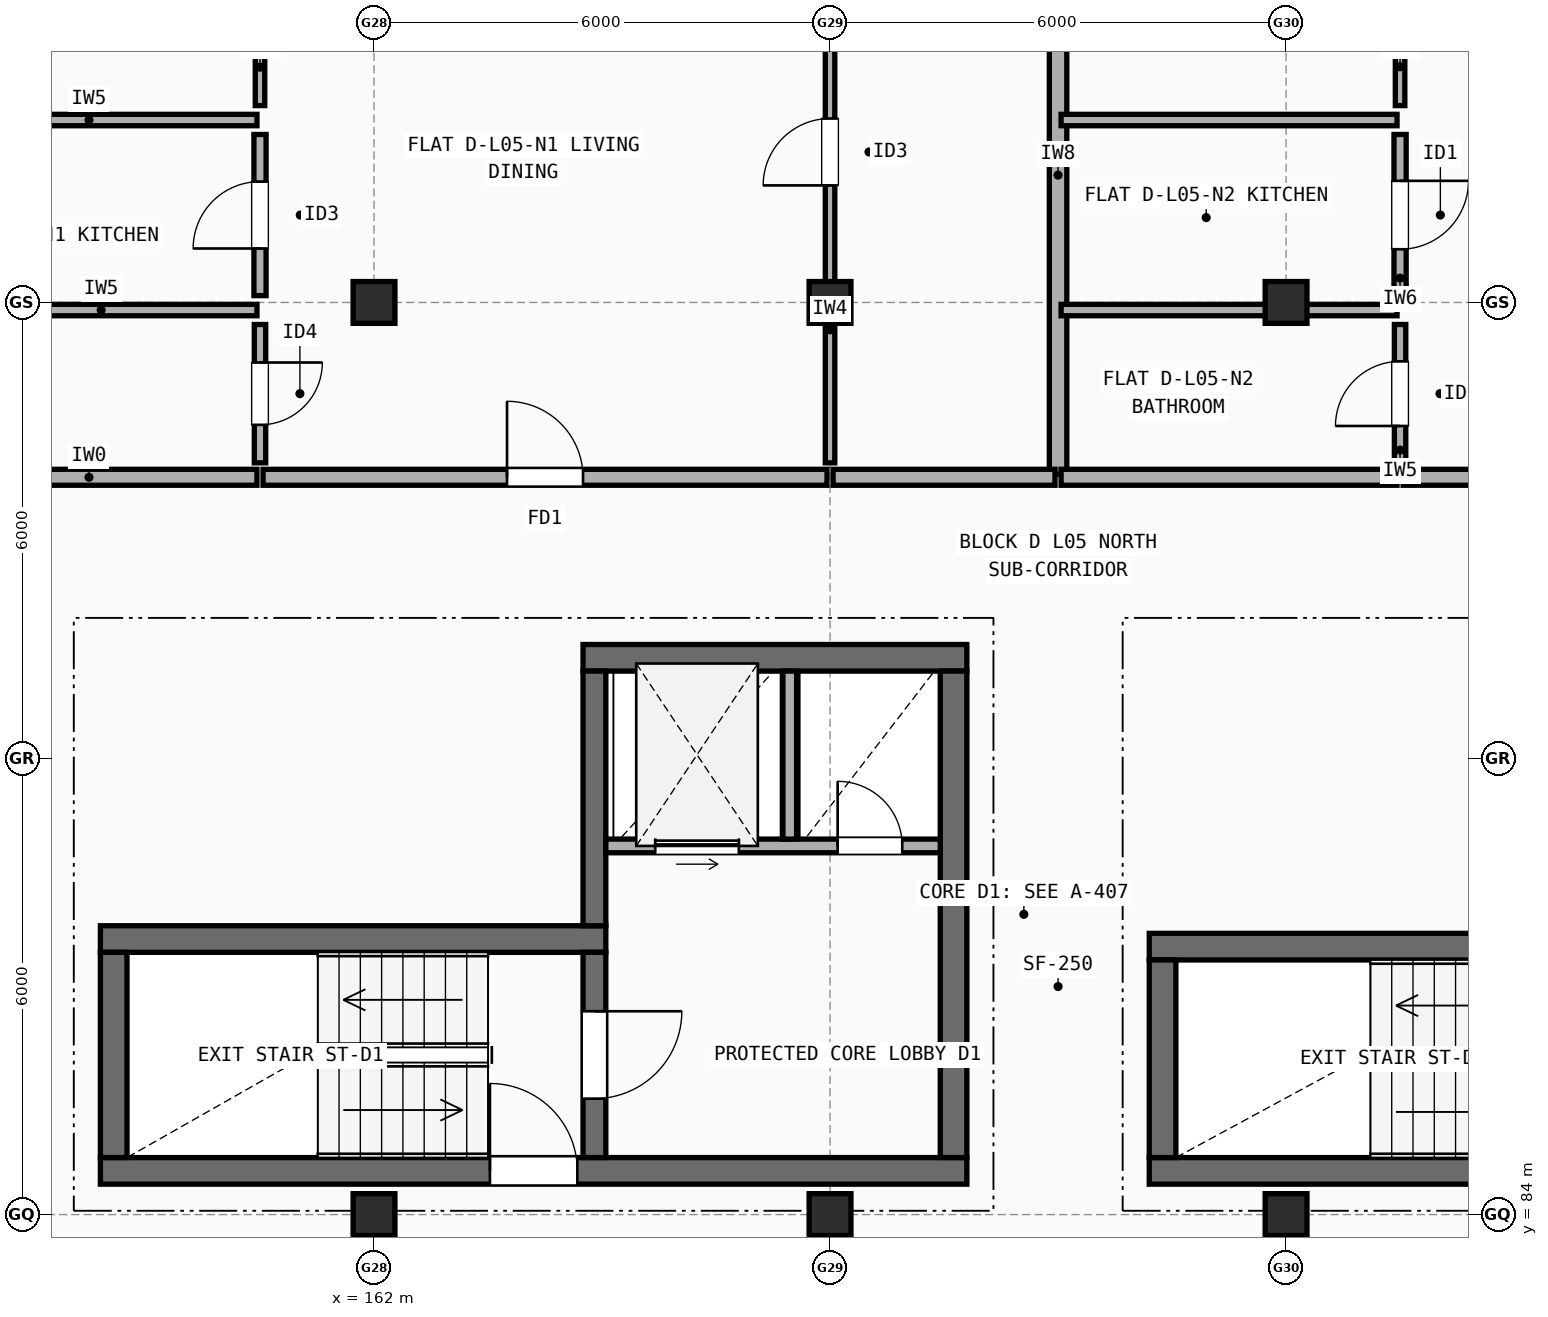
"""IFC4 building model, lengths in metres.
Left out: names, types, materials, properties, quantities, classifications, styles, units other than length and angle.
Written with IfcOpenShell. Run it as: python <this file> out.ifc"""

import sys

from ifc_helpers import new_model, si_unit, direction, frame, frame_2d, origin, origin_2d, place, context, subcontext, project, spatial, rectangle, extrude, element, fill, save


model = new_model("IFC4")
c1 = context("Model", 3, precision=1e-05, world=origin(), true_north=direction((0.0, 1.0)))
c2 = subcontext(c1, "Body", "Model", "MODEL_VIEW")
j1 = project(units=[si_unit("LENGTHUNIT", "METRE"), si_unit("PLANEANGLEUNIT", "RADIAN")], contexts=[c1])
p1 = place(None, origin())
s1 = spatial("IfcSite", under=j1, at=p1, CompositionType="ELEMENT")
p2 = place(p1, origin())
s2 = spatial("IfcBuilding", under=s1, at=p2, CompositionType="ELEMENT")
p3 = place(p2, frame((0.0, 0.0, 17.3)))
s3 = spatial("IfcBuildingStorey", under=s2, at=p3, CompositionType="ELEMENT", Elevation=17.3)
for number, where, z_axis, x_axis in (
    (1, (162.0, 84.0, 0.0), (0.0, 0.0, 1.0), (1.0, 0.0, 0.0)),
    (2, (162.0, 96.0, 0.0), (0.0, 0.0, 1.0), (1.0, 0.0, 0.0)),
    (3, (168.0, 84.0, 0.0), (0.0, 0.0, 1.0), (1.0, 0.0, 0.0)),
    (4, (168.0, 96.0, 0.0), (0.0, 0.0, 1.0), (1.0, 0.0, 0.0)),
    (5, (174.0, 84.0, 0.0), (0.0, 0.0, 1.0), (1.0, 0.0, 0.0)),
    (6, (174.0, 96.0, 0.0), (0.0, 0.0, 1.0), (1.0, 0.0, 0.0)),
):
    element("IfcColumn", number, at=place(p3, frame(where, z_axis=z_axis, x_axis=x_axis)), inside=s3, PredefinedType="COLUMN", context=c2, shape_type="SweptSolid", body=[
        extrude(rectangle(XDim=0.55, YDim=0.55, at=origin_2d()), origin(), (0.0, 0.0, 1.0), 2.965),
    ])
p4 = place(p3, frame((158.4, 84.575, 0.0), z_axis=(0.0, 0.0, 1.0), x_axis=(1.0, 0.0, 0.0)))
e7 = element("IfcWall", 7, at=p4, inside=s3, PredefinedType="SHEAR", context=c2, shape_type="SweptSolid", body=[
    extrude(rectangle(XDim=11.4, YDim=0.35, at=frame_2d((5.7, 0.0))), origin(), (0.0, 0.0, 1.0), 2.965),
])
p5 = place(p4, frame((5.125, 0.0, 0.0)))
e8 = element("IfcOpeningElement", 8, at=p5, cuts=e7, PredefinedType="OPENING", context=c2, shape_type="SweptSolid", body=[
    extrude(rectangle(XDim=1.15, YDim=2.15, at=frame_2d((0.575, 1.075))), frame((0.0, 0.185, 0.0), z_axis=(0.0, -1.0, 0.0), x_axis=(1.0, 0.0, 0.0)), (0.0, 0.0, 1.0), 0.37),
])
p6 = place(p3, frame((165.05, 87.625, 0.0), z_axis=(0.0, 0.0, 1.0), x_axis=(-1.0, 0.0, 0.0)))
e9 = element("IfcWall", 9, at=p6, inside=s3, PredefinedType="SHEAR", context=c2, shape_type="SweptSolid", body=[
    extrude(rectangle(XDim=6.65, YDim=0.35, at=frame_2d((3.325, 0.0))), origin(), (0.0, 0.0, 1.0), 2.965),
])
p7 = place(p3, frame((158.575, 87.45, 0.0), z_axis=(0.0, 0.0, 1.0), x_axis=(0.0, -1.0, 0.0)))
e10 = element("IfcWall", 10, at=p7, inside=s3, PredefinedType="SHEAR", context=c2, shape_type="SweptSolid", body=[
    extrude(rectangle(XDim=2.7, YDim=0.35, at=frame_2d((1.35, 0.0))), origin(), (0.0, 0.0, 1.0), 2.965),
])
p8 = place(p3, frame((164.9, 84.75, 0.0), z_axis=(0.0, 0.0, 1.0), x_axis=(0.0, 1.0, 0.0)))
e11 = element("IfcWall", 11, at=p8, inside=s3, PredefinedType="SHEAR", context=c2, shape_type="SweptSolid", body=[
    extrude(rectangle(XDim=2.7, YDim=0.3, at=frame_2d((1.35, 0.0))), origin(), (0.0, 0.0, 1.0), 2.965),
])
p9 = place(p8, frame((0.775, 0.0, 0.0)))
e12 = element("IfcOpeningElement", 12, at=p9, cuts=e11, PredefinedType="OPENING", context=c2, shape_type="SweptSolid", body=[
    extrude(rectangle(XDim=1.15, YDim=2.15, at=frame_2d((0.575, 1.075))), frame((0.0, 0.16, 0.0), z_axis=(0.0, -1.0, 0.0), x_axis=(1.0, 0.0, 0.0)), (0.0, 0.0, 1.0), 0.32),
])
p10 = place(p3, frame((169.8, 91.325, 0.0), z_axis=(0.0, 0.0, 1.0), x_axis=(-1.0, 0.0, 0.0)))
e13 = element("IfcWall", 13, at=p10, inside=s3, PredefinedType="SHEAR", context=c2, shape_type="SweptSolid", body=[
    extrude(rectangle(XDim=5.05, YDim=0.35, at=frame_2d((2.525, 0.0))), origin(), (0.0, 0.0, 1.0), 2.965),
])
p11 = place(p3, frame((169.625, 84.75, 0.0), z_axis=(0.0, 0.0, 1.0), x_axis=(0.0, 1.0, 0.0)))
e14 = element("IfcWall", 14, at=p11, inside=s3, PredefinedType="SHEAR", context=c2, shape_type="SweptSolid", body=[
    extrude(rectangle(XDim=6.4, YDim=0.35, at=frame_2d((3.2, 0.0))), origin(), (0.0, 0.0, 1.0), 2.965),
])
p12 = place(p3, frame((164.9, 87.8, 0.0), z_axis=(0.0, 0.0, 1.0), x_axis=(0.0, 1.0, 0.0)))
e15 = element("IfcWall", 15, at=p12, inside=s3, PredefinedType="SHEAR", context=c2, shape_type="SweptSolid", body=[
    extrude(rectangle(XDim=3.35, YDim=0.3, at=frame_2d((1.675, 0.0))), origin(), (0.0, 0.0, 1.0), 2.965),
])
p13 = place(p3, frame((165.05, 88.85, 0.0), z_axis=(0.0, 0.0, 1.0), x_axis=(1.0, 0.0, 0.0)))
e16 = element("IfcWall", 16, at=p13, inside=s3, PredefinedType="SOLIDWALL", context=c2, shape_type="SweptSolid", body=[
    extrude(rectangle(XDim=4.4, YDim=0.18, at=frame_2d((2.2, 0.0))), origin(), (0.0, 0.0, 1.0), 2.965),
])
p14 = place(p13, frame((0.65, 0.0, 0.0)))
e17 = element("IfcOpeningElement", 17, at=p14, cuts=e16, PredefinedType="OPENING", context=c2, shape_type="SweptSolid", body=[
    extrude(rectangle(XDim=1.1, YDim=2.15, at=frame_2d((0.55, 1.075))), frame((0.0, 0.1, 0.0), z_axis=(0.0, -1.0, 0.0), x_axis=(1.0, 0.0, 0.0)), (0.0, 0.0, 1.0), 0.2),
])
p15 = place(p13, frame((3.05, 0.0, 0.0)))
e18 = element("IfcOpeningElement", 18, at=p15, cuts=e16, PredefinedType="OPENING", context=c2, shape_type="SweptSolid", body=[
    extrude(rectangle(XDim=0.85, YDim=2.1, at=frame_2d((0.425, 1.05))), frame((0.0, 0.1, 0.0), z_axis=(0.0, -1.0, 0.0), x_axis=(1.0, 0.0, 0.0)), (0.0, 0.0, 1.0), 0.2),
])
p16 = place(p3, frame((167.47, 88.94, 0.0), z_axis=(0.0, 0.0, 1.0), x_axis=(0.0, 1.0, 0.0)))
e19 = element("IfcWall", 19, at=p16, inside=s3, PredefinedType="SOLIDWALL", context=c2, shape_type="SweptSolid", body=[
    extrude(rectangle(XDim=2.21, YDim=0.18, at=frame_2d((1.105, 0.0))), origin(), (0.0, 0.0, 1.0), 2.965),
])
p17 = place(p3, frame((172.2, 84.575, 0.0), z_axis=(0.0, 0.0, 1.0), x_axis=(1.0, 0.0, 0.0)))
e20 = element("IfcWall", 20, at=p17, inside=s3, PredefinedType="SHEAR", context=c2, shape_type="SweptSolid", body=[
    extrude(rectangle(XDim=11.4, YDim=0.35, at=frame_2d((5.7, 0.0))), origin(), (0.0, 0.0, 1.0), 2.965),
])
p18 = place(p17, frame((8.15, 0.0, 0.0)))
e21 = element("IfcOpeningElement", 21, at=p18, cuts=e20, PredefinedType="OPENING", context=c2, shape_type="SweptSolid", body=[
    extrude(rectangle(XDim=1.2, YDim=2.15, at=frame_2d((0.6, 1.075))), frame((0.0, 0.185, 0.0), z_axis=(0.0, -1.0, 0.0), x_axis=(1.0, 0.0, 0.0)), (0.0, 0.0, 1.0), 0.37),
])
p19 = place(p3, frame((178.85, 87.525, 0.0), z_axis=(0.0, 0.0, 1.0), x_axis=(-1.0, 0.0, 0.0)))
e22 = element("IfcWall", 22, at=p19, inside=s3, PredefinedType="SHEAR", context=c2, shape_type="SweptSolid", body=[
    extrude(rectangle(XDim=6.65, YDim=0.35, at=frame_2d((3.325, 0.0))), origin(), (0.0, 0.0, 1.0), 2.965),
])
p20 = place(p3, frame((172.375, 87.35, 0.0), z_axis=(0.0, 0.0, 1.0), x_axis=(0.0, -1.0, 0.0)))
e23 = element("IfcWall", 23, at=p20, inside=s3, PredefinedType="SHEAR", context=c2, shape_type="SweptSolid", body=[
    extrude(rectangle(XDim=2.6, YDim=0.35, at=frame_2d((1.3, 0.0))), origin(), (0.0, 0.0, 1.0), 2.965),
])
p21 = place(p3, frame((171.0, 93.74, 0.0), z_axis=(0.0, 0.0, 1.0), x_axis=(0.0, 1.0, 0.0)))
e24 = element("IfcWall", 24, at=p21, inside=s3, PredefinedType="SOLIDWALL", context=c2, shape_type="SweptSolid", body=[
    extrude(rectangle(XDim=7.87, YDim=0.23, at=frame_2d((3.935, 0.0))), origin(), (0.0, 0.0, 1.0), 2.508),
])
p22 = place(p3, frame((156.04, 93.7, 0.0), z_axis=(0.0, 0.0, 1.0), x_axis=(1.0, 0.0, 0.0)))
e25 = element("IfcWall", 25, at=p22, inside=s3, PredefinedType="SOLIDWALL", context=c2, shape_type="SweptSolid", body=[
    extrude(rectangle(XDim=4.42, YDim=0.21, at=frame_2d((2.21, 0.0))), origin(), (0.0, 0.0, 1.0), 2.447),
])
p23 = place(p3, frame((160.54, 93.7, 0.0), z_axis=(0.0, 0.0, 1.0), x_axis=(1.0, 0.0, 0.0)))
e26 = element("IfcWall", 26, at=p23, inside=s3, PredefinedType="SOLIDWALL", context=c2, shape_type="SweptSolid", body=[
    extrude(rectangle(XDim=7.42, YDim=0.21, at=frame_2d((3.71, 0.0))), origin(), (0.0, 0.0, 1.0), 2.508),
])
p24 = place(p23, frame((3.21, 0.0, 0.0)))
e27 = element("IfcOpeningElement", 27, at=p24, cuts=e26, PredefinedType="OPENING", context=c2, shape_type="SweptSolid", body=[
    extrude(rectangle(XDim=1.0, YDim=2.15, at=frame_2d((0.5, 1.075))), frame((0.0, 0.115, 0.0), z_axis=(0.0, -1.0, 0.0), x_axis=(1.0, 0.0, 0.0)), (0.0, 0.0, 1.0), 0.23),
])
p25 = place(p3, frame((160.5, 98.59, 0.0), z_axis=(0.0, 0.0, 1.0), x_axis=(0.0, 1.0, 0.0)))
e28 = element("IfcWall", 28, at=p25, inside=s3, PredefinedType="PARTITIONING", context=c2, shape_type="SweptSolid", body=[
    extrude(rectangle(XDim=3.22, YDim=0.125, at=frame_2d((1.61, 0.0))), origin(), (0.0, 0.0, 1.0), 2.965),
])
p26 = place(p25, frame((1.16, 0.0, 0.0)))
e29 = element("IfcOpeningElement", 29, at=p26, cuts=e28, PredefinedType="OPENING", context=c2, shape_type="SweptSolid", body=[
    extrude(rectangle(XDim=0.9, YDim=2.1, at=frame_2d((0.45, 1.05))), frame((0.0, 0.073, 0.0), z_axis=(0.0, -1.0, 0.0), x_axis=(1.0, 0.0, 0.0)), (0.0, 0.0, 1.0), 0.145),
])
p27 = place(p3, frame((160.5, 96.09, 0.0), z_axis=(0.0, 0.0, 1.0), x_axis=(0.0, 1.0, 0.0)))
e30 = element("IfcWall", 30, at=p27, inside=s3, PredefinedType="PLUMBINGWALL", context=c2, shape_type="SweptSolid", body=[
    extrude(rectangle(XDim=2.12, YDim=0.16, at=frame_2d((1.06, 0.0))), origin(), (0.0, 0.0, 1.0), 2.408),
])
p28 = place(p27, frame((0.62, 0.0, 0.0)))
e31 = element("IfcOpeningElement", 31, at=p28, cuts=e30, PredefinedType="OPENING", context=c2, shape_type="SweptSolid", body=[
    extrude(rectangle(XDim=0.88, YDim=2.1, at=frame_2d((0.44, 1.05))), frame((0.0, 0.09, 0.0), z_axis=(0.0, -1.0, 0.0), x_axis=(1.0, 0.0, 0.0)), (0.0, 0.0, 1.0), 0.18),
])
p29 = place(p3, frame((160.5, 93.89, 0.0), z_axis=(0.0, 0.0, 1.0), x_axis=(0.0, 1.0, 0.0)))
e32 = element("IfcWall", 32, at=p29, inside=s3, PredefinedType="PARTITIONING", context=c2, shape_type="SweptSolid", body=[
    extrude(rectangle(XDim=1.82, YDim=0.15, at=frame_2d((0.91, 0.0))), origin(), (0.0, 0.0, 1.0), 2.965),
])
p30 = place(p29, frame((0.5, 0.0, 0.0)))
e33 = element("IfcOpeningElement", 33, at=p30, cuts=e32, PredefinedType="OPENING", context=c2, shape_type="SweptSolid", body=[
    extrude(rectangle(XDim=0.82, YDim=2.08, at=frame_2d((0.41, 1.04))), frame((0.0, 0.085, 0.0), z_axis=(0.0, -1.0, 0.0), x_axis=(1.0, 0.0, 0.0)), (0.0, 0.0, 1.0), 0.17),
])
p31 = place(p3, frame((156.04, 98.4, 0.0), z_axis=(0.0, 0.0, 1.0), x_axis=(1.0, 0.0, 0.0)))
e34 = element("IfcWall", 34, at=p31, inside=s3, PredefinedType="PARTITIONING", context=c2, shape_type="SweptSolid", body=[
    extrude(rectangle(XDim=4.42, YDim=0.15, at=frame_2d((2.21, 0.0))), origin(), (0.0, 0.0, 1.0), 2.447),
])
p32 = place(p3, frame((156.36, 95.9, 0.0), z_axis=(0.0, 0.0, 1.0), x_axis=(1.0, 0.0, 0.0)))
e35 = element("IfcWall", 35, at=p32, inside=s3, PredefinedType="PARTITIONING", context=c2, shape_type="SweptSolid", body=[
    extrude(rectangle(XDim=4.1, YDim=0.15, at=frame_2d((2.05, 0.0))), origin(), (0.0, 0.0, 1.0), 2.408),
])
p33 = place(p3, frame((168.04, 93.7, 0.0), z_axis=(0.0, 0.0, 1.0), x_axis=(1.0, 0.0, 0.0)))
e36 = element("IfcWall", 36, at=p33, inside=s3, PredefinedType="SOLIDWALL", context=c2, shape_type="SweptSolid", body=[
    extrude(rectangle(XDim=2.92, YDim=0.21, at=frame_2d((1.46, 0.0))), origin(), (0.0, 0.0, 1.0), 2.508),
])
p34 = place(p3, frame((168.0, 93.89, 0.0), z_axis=(0.0, 0.0, 1.0), x_axis=(0.0, 1.0, 0.0)))
e37 = element("IfcWall", 37, at=p34, inside=s3, PredefinedType="PARTITIONING", context=c2, shape_type="SweptSolid", body=[
    extrude(rectangle(XDim=7.6, YDim=0.125, at=frame_2d((3.8, 0.0))), origin(), (0.0, 0.0, 1.0), 2.458),
])
p35 = place(p34, frame((3.65, 0.0, 0.0)))
e38 = element("IfcOpeningElement", 38, at=p35, cuts=e37, PredefinedType="OPENING", context=c2, shape_type="SweptSolid", body=[
    extrude(rectangle(XDim=0.88, YDim=2.1, at=frame_2d((0.44, 1.05))), frame((0.0, 0.073, 0.0), z_axis=(0.0, -1.0, 0.0), x_axis=(1.0, 0.0, 0.0)), (0.0, 0.0, 1.0), 0.145),
])
p36 = place(p3, frame((171.04, 93.7, 0.0), z_axis=(0.0, 0.0, 1.0), x_axis=(1.0, 0.0, 0.0)))
e39 = element("IfcWall", 39, at=p36, inside=s3, PredefinedType="SOLIDWALL", context=c2, shape_type="SweptSolid", body=[
    extrude(rectangle(XDim=4.42, YDim=0.21, at=frame_2d((2.21, 0.0))), origin(), (0.0, 0.0, 1.0), 2.965),
])
p37 = place(p3, frame((175.54, 93.7, 0.0), z_axis=(0.0, 0.0, 1.0), x_axis=(1.0, 0.0, 0.0)))
e40 = element("IfcWall", 40, at=p37, inside=s3, PredefinedType="SOLIDWALL", context=c2, shape_type="SweptSolid", body=[
    extrude(rectangle(XDim=7.42, YDim=0.21, at=frame_2d((3.71, 0.0))), origin(), (0.0, 0.0, 1.0), 2.965),
])
p38 = place(p37, frame((3.185, 0.0, 0.0)))
e41 = element("IfcOpeningElement", 41, at=p38, cuts=e40, PredefinedType="OPENING", context=c2, shape_type="SweptSolid", body=[
    extrude(rectangle(XDim=1.05, YDim=2.15, at=frame_2d((0.525, 1.075))), frame((0.0, 0.115, 0.0), z_axis=(0.0, -1.0, 0.0), x_axis=(1.0, 0.0, 0.0)), (0.0, 0.0, 1.0), 0.23),
])
p39 = place(p3, frame((175.5, 98.59, 0.0), z_axis=(0.0, 0.0, 1.0), x_axis=(0.0, 1.0, 0.0)))
e42 = element("IfcWall", 42, at=p39, inside=s3, PredefinedType="PARTITIONING", context=c2, shape_type="SweptSolid", body=[
    extrude(rectangle(XDim=3.22, YDim=0.125, at=frame_2d((1.61, 0.0))), origin(), (0.0, 0.0, 1.0), 2.965),
])
p40 = place(p39, frame((1.17, 0.0, 0.0)))
e43 = element("IfcOpeningElement", 43, at=p40, cuts=e42, PredefinedType="OPENING", context=c2, shape_type="SweptSolid", body=[
    extrude(rectangle(XDim=0.88, YDim=2.1, at=frame_2d((0.44, 1.05))), frame((0.0, 0.073, 0.0), z_axis=(0.0, -1.0, 0.0), x_axis=(1.0, 0.0, 0.0)), (0.0, 0.0, 1.0), 0.145),
])
p41 = place(p3, frame((175.5, 96.09, 0.0), z_axis=(0.0, 0.0, 1.0), x_axis=(0.0, 1.0, 0.0)))
e44 = element("IfcWall", 44, at=p41, inside=s3, PredefinedType="PLUMBINGWALL", context=c2, shape_type="SweptSolid", body=[
    extrude(rectangle(XDim=2.12, YDim=0.16, at=frame_2d((1.06, 0.0))), origin(), (0.0, 0.0, 1.0), 2.408),
])
p42 = place(p41, frame((0.61, 0.0, 0.0)))
e45 = element("IfcOpeningElement", 45, at=p42, cuts=e44, PredefinedType="OPENING", context=c2, shape_type="SweptSolid", body=[
    extrude(rectangle(XDim=0.9, YDim=2.1, at=frame_2d((0.45, 1.05))), frame((0.0, 0.09, 0.0), z_axis=(0.0, -1.0, 0.0), x_axis=(1.0, 0.0, 0.0)), (0.0, 0.0, 1.0), 0.18),
])
p43 = place(p3, frame((175.5, 93.89, 0.0), z_axis=(0.0, 0.0, 1.0), x_axis=(0.0, 1.0, 0.0)))
e46 = element("IfcWall", 46, at=p43, inside=s3, PredefinedType="PARTITIONING", context=c2, shape_type="SweptSolid", body=[
    extrude(rectangle(XDim=1.82, YDim=0.15, at=frame_2d((0.91, 0.0))), origin(), (0.0, 0.0, 1.0), 2.965),
])
p44 = place(p43, frame((0.485, 0.0, 0.0)))
e47 = element("IfcOpeningElement", 47, at=p44, cuts=e46, PredefinedType="OPENING", context=c2, shape_type="SweptSolid", body=[
    extrude(rectangle(XDim=0.85, YDim=2.1, at=frame_2d((0.425, 1.05))), frame((0.0, 0.085, 0.0), z_axis=(0.0, -1.0, 0.0), x_axis=(1.0, 0.0, 0.0)), (0.0, 0.0, 1.0), 0.17),
])
p45 = place(p3, frame((171.04, 98.4, 0.0), z_axis=(0.0, 0.0, 1.0), x_axis=(1.0, 0.0, 0.0)))
e48 = element("IfcWall", 48, at=p45, inside=s3, PredefinedType="PARTITIONING", context=c2, shape_type="SweptSolid", body=[
    extrude(rectangle(XDim=4.42, YDim=0.15, at=frame_2d((2.21, 0.0))), origin(), (0.0, 0.0, 1.0), 2.458),
])
p46 = place(p3, frame((171.04, 95.9, 0.0), z_axis=(0.0, 0.0, 1.0), x_axis=(1.0, 0.0, 0.0)))
e49 = element("IfcWall", 49, at=p46, inside=s3, PredefinedType="PARTITIONING", context=c2, shape_type="SweptSolid", body=[
    extrude(rectangle(XDim=4.42, YDim=0.15, at=frame_2d((2.21, 0.0))), origin(), (0.0, 0.0, 1.0), 2.408),
])
p47 = place(p5, origin())
e50 = element("IfcDoor", 50, at=p47, inside=s3, OperationType="SINGLE_SWING_LEFT", PredefinedType="DOOR", context=c2, shape_type="SweptSolid", body=[
    extrude(rectangle(XDim=1.15, YDim=2.15, at=frame_2d((0.575, 1.075))), frame((0.0, 0.025, 0.0), z_axis=(0.0, -1.0, 0.0), x_axis=(1.0, 0.0, 0.0)), (0.0, 0.0, 1.0), 0.05),
])
fill(e8, e50)
p48 = place(p9, origin())
e51 = element("IfcDoor", 51, at=p48, inside=s3, OperationType="SINGLE_SWING_RIGHT", PredefinedType="DOOR", context=c2, shape_type="SweptSolid", body=[
    extrude(rectangle(XDim=1.15, YDim=2.15, at=frame_2d((0.575, 1.075))), frame((0.0, 0.025, 0.0), z_axis=(0.0, -1.0, 0.0), x_axis=(1.0, 0.0, 0.0)), (0.0, 0.0, 1.0), 0.05),
])
fill(e12, e51)
p49 = place(p14, origin())
e52 = element("IfcDoor", 52, at=p49, inside=s3, OperationType="SLIDING_TO_LEFT", PredefinedType="DOOR", context=c2, shape_type="SweptSolid", body=[
    extrude(rectangle(XDim=1.1, YDim=2.15, at=frame_2d((0.55, 1.075))), frame((0.0, 0.025, 0.0), z_axis=(0.0, -1.0, 0.0), x_axis=(1.0, 0.0, 0.0)), (0.0, 0.0, 1.0), 0.05),
])
fill(e17, e52)
p50 = place(p15, frame((0.85, 0.0, 0.0), z_axis=(0.0, 0.0, 1.0), x_axis=(-1.0, 0.0, 0.0)))
e53 = element("IfcDoor", 53, at=p50, inside=s3, OperationType="SINGLE_SWING_LEFT", PredefinedType="DOOR", context=c2, shape_type="SweptSolid", body=[
    extrude(rectangle(XDim=0.85, YDim=2.1, at=frame_2d((0.425, 1.05))), frame((0.0, 0.025, 0.0), z_axis=(0.0, -1.0, 0.0), x_axis=(1.0, 0.0, 0.0)), (0.0, 0.0, 1.0), 0.05),
])
fill(e18, e53)
p51 = place(p24, origin())
e54 = element("IfcDoor", 54, at=p51, inside=s3, OperationType="SINGLE_SWING_LEFT", PredefinedType="DOOR", context=c2, shape_type="SweptSolid", body=[
    extrude(rectangle(XDim=1.0, YDim=2.15, at=frame_2d((0.5, 1.075))), frame((0.0, 0.025, 0.0), z_axis=(0.0, -1.0, 0.0), x_axis=(1.0, 0.0, 0.0)), (0.0, 0.0, 1.0), 0.05),
])
fill(e27, e54)
p52 = place(p28, origin())
e55 = element("IfcDoor", 55, at=p52, inside=s3, OperationType="SINGLE_SWING_LEFT", PredefinedType="DOOR", context=c2, shape_type="SweptSolid", body=[
    extrude(rectangle(XDim=0.88, YDim=2.1, at=frame_2d((0.44, 1.05))), frame((0.0, 0.025, 0.0), z_axis=(0.0, -1.0, 0.0), x_axis=(1.0, 0.0, 0.0)), (0.0, 0.0, 1.0), 0.05),
])
fill(e31, e55)
p53 = place(p30, origin())
e56 = element("IfcDoor", 56, at=p53, inside=s3, OperationType="SINGLE_SWING_RIGHT", PredefinedType="DOOR", context=c2, shape_type="SweptSolid", body=[
    extrude(rectangle(XDim=0.82, YDim=2.08, at=frame_2d((0.41, 1.04))), frame((0.0, 0.025, 0.0), z_axis=(0.0, -1.0, 0.0), x_axis=(1.0, 0.0, 0.0)), (0.0, 0.0, 1.0), 0.05),
])
fill(e33, e56)
p54 = place(p35, origin())
e57 = element("IfcDoor", 57, at=p54, inside=s3, OperationType="SINGLE_SWING_LEFT", PredefinedType="DOOR", context=c2, shape_type="SweptSolid", body=[
    extrude(rectangle(XDim=0.88, YDim=2.1, at=frame_2d((0.44, 1.05))), frame((0.0, 0.025, 0.0), z_axis=(0.0, -1.0, 0.0), x_axis=(1.0, 0.0, 0.0)), (0.0, 0.0, 1.0), 0.05),
])
fill(e38, e57)
p55 = place(p42, origin())
e58 = element("IfcDoor", 58, at=p55, inside=s3, OperationType="SINGLE_SWING_RIGHT", PredefinedType="DOOR", context=c2, shape_type="SweptSolid", body=[
    extrude(rectangle(XDim=0.9, YDim=2.1, at=frame_2d((0.45, 1.05))), frame((0.0, 0.025, 0.0), z_axis=(0.0, -1.0, 0.0), x_axis=(1.0, 0.0, 0.0)), (0.0, 0.0, 1.0), 0.05),
])
fill(e45, e58)
p56 = place(p44, origin())
e59 = element("IfcDoor", 59, at=p56, inside=s3, OperationType="SINGLE_SWING_LEFT", PredefinedType="DOOR", context=c2, shape_type="SweptSolid", body=[
    extrude(rectangle(XDim=0.85, YDim=2.1, at=frame_2d((0.425, 1.05))), frame((0.0, 0.025, 0.0), z_axis=(0.0, -1.0, 0.0), x_axis=(1.0, 0.0, 0.0)), (0.0, 0.0, 1.0), 0.05),
])
fill(e47, e59)
save(model, sys.argv[1])
